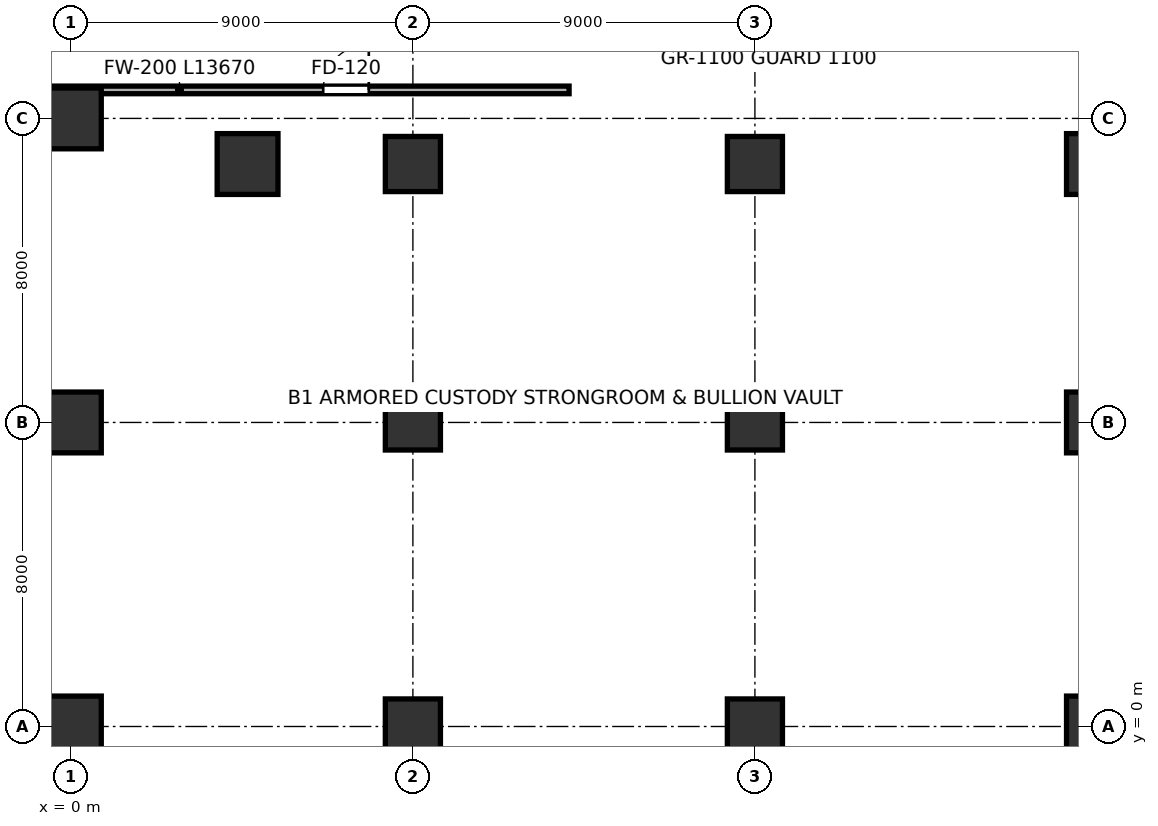
"""IFC4 building model, lengths in metres.
Left out: names, types, materials, properties, quantities, classifications, styles, units other than length and angle.
Written with IfcOpenShell. Run it as: python <this file> out.ifc"""

import sys

from ifc_helpers import new_model, si_unit, direction, frame, frame_2d, origin, origin_2d, place, context, subcontext, project, spatial, rectangle, extrude, source, transform, mapped, element, fill, save


model = new_model("IFC4")
c1 = context("Model", 3, precision=1e-05, world=origin(), true_north=direction((0.0, 1.0)))
c2 = subcontext(c1, "Body", "Model", "MODEL_VIEW")
j1 = project(units=[si_unit("LENGTHUNIT", "METRE"), si_unit("PLANEANGLEUNIT", "RADIAN")], contexts=[c1])
p1 = place(None, origin())
s1 = spatial("IfcSite", under=j1, at=p1, CompositionType="ELEMENT")
p2 = place(p1, origin())
s2 = spatial("IfcBuilding", under=s1, at=p2, CompositionType="ELEMENT")
p3 = place(p2, frame((0.0, 0.0, -4.8)))
s3 = spatial("IfcBuildingStorey", under=s2, at=p3, CompositionType="ELEMENT", Elevation=-4.8)
m1 = source(origin(), c2, "Body", "SweptSolid", [
    extrude(rectangle(XDim=1.6, YDim=1.6, at=origin_2d()), origin(), (0.0, 0.0, 1.0), 4.599),
])
p4 = place(p3, frame((0.0, 0.0, 0.001), z_axis=(0.0, 0.0, 1.0), x_axis=(1.0, 0.0, 0.0)))
e1 = element("IfcColumn", 1, at=p4, inside=s3, PredefinedType="COLUMN", context=c2, shape_type="MappedRepresentation", body=[
    mapped(m1, transform((0.0, 0.0, 0.0), scale=1.0)),
])
m2 = source(origin(), c2, "Body", "SweptSolid", [
    extrude(rectangle(XDim=1.6, YDim=1.6, at=origin_2d()), origin(), (0.0, 0.0, 1.0), 4.799),
])
for number, where, z_axis, x_axis in (
    (2, (0.0, 8.0, 0.001), (0.0, 0.0, 1.0), (1.0, 0.0, 0.0)),
    (3, (0.0, 16.0, 0.001), (0.0, 0.0, 1.0), (1.0, 0.0, 0.0)),
):
    element("IfcColumn", number, at=place(p3, frame(where, z_axis=z_axis, x_axis=x_axis)), inside=s3, PredefinedType="COLUMN", context=c2, shape_type="MappedRepresentation", body=[
        mapped(m2, transform((0.0, 0.0, 0.0), scale=1.0)),
    ])
m3 = source(origin(), c2, "Body", "SweptSolid", [
    extrude(rectangle(XDim=1.45, YDim=1.45, at=origin_2d()), origin(), (0.0, 0.0, 1.0), 4.799),
])
p5 = place(p3, frame((9.0, 0.0, 0.001), z_axis=(0.0, 0.0, 1.0), x_axis=(1.0, 0.0, 0.0)))
e4 = element("IfcColumn", 4, at=p5, inside=s3, PredefinedType="COLUMN", context=c2, shape_type="MappedRepresentation", body=[
    mapped(m3, transform((0.0, 0.0, 0.0), scale=1.0)),
])
m4 = source(origin(), c2, "Body", "SweptSolid", [
    extrude(rectangle(XDim=1.45, YDim=1.45, at=origin_2d()), origin(), (0.0, 0.0, 1.0), 4.799),
])
for number, where, z_axis, x_axis in (
    (5, (9.0, 8.0, 0.001), (0.0, 0.0, 1.0), (1.0, 0.0, 0.0)),
    (6, (9.0, 14.8, 0.001), (0.0, 0.0, 1.0), (1.0, 0.0, 0.0)),
):
    element("IfcColumn", number, at=place(p3, frame(where, z_axis=z_axis, x_axis=x_axis)), inside=s3, PredefinedType="COLUMN", context=c2, shape_type="MappedRepresentation", body=[
        mapped(m4, transform((0.0, 0.0, 0.0), scale=1.0)),
    ])
p6 = place(p3, frame((18.0, 0.0, 0.001), z_axis=(0.0, 0.0, 1.0), x_axis=(1.0, 0.0, 0.0)))
e7 = element("IfcColumn", 7, at=p6, inside=s3, PredefinedType="COLUMN", context=c2, shape_type="MappedRepresentation", body=[
    mapped(m3, transform((0.0, 0.0, 0.0), scale=1.0)),
])
for number, where, z_axis, x_axis in (
    (8, (18.0, 8.0, 0.001), (0.0, 0.0, 1.0), (1.0, 0.0, 0.0)),
    (9, (18.0, 14.8, 0.001), (0.0, 0.0, 1.0), (1.0, 0.0, 0.0)),
):
    element("IfcColumn", number, at=place(p3, frame(where, z_axis=z_axis, x_axis=x_axis)), inside=s3, PredefinedType="COLUMN", context=c2, shape_type="MappedRepresentation", body=[
        mapped(m4, transform((0.0, 0.0, 0.0), scale=1.0)),
    ])
p7 = place(p3, frame((27.0, 0.0, 0.001), z_axis=(0.0, 0.0, 1.0), x_axis=(1.0, 0.0, 0.0)))
e10 = element("IfcColumn", 10, at=p7, inside=s3, PredefinedType="COLUMN", context=c2, shape_type="MappedRepresentation", body=[
    mapped(m2, transform((0.0, 0.0, 0.0), scale=1.0)),
])
m5 = source(origin(), c2, "Body", "SweptSolid", [
    extrude(rectangle(XDim=1.6, YDim=1.6, at=origin_2d()), origin(), (0.0, 0.0, 1.0), 4.799),
])
for number, where, z_axis, x_axis in (
    (11, (27.0, 8.0, 0.001), (0.0, 0.0, 1.0), (1.0, 0.0, 0.0)),
    (12, (27.0, 14.8, 0.001), (0.0, 0.0, 1.0), (1.0, 0.0, 0.0)),
    (13, (4.65, 14.8, 0.001), (0.0, 0.0, 1.0), (1.0, 0.0, 0.0)),
):
    element("IfcColumn", number, at=place(p3, frame(where, z_axis=z_axis, x_axis=x_axis)), inside=s3, PredefinedType="COLUMN", context=c2, shape_type="MappedRepresentation", body=[
        mapped(m5, transform((0.0, 0.0, 0.0), scale=1.0)),
    ])
p8 = place(p3, frame((-0.56, 16.75, 0.0), z_axis=(0.0, 0.0, 1.0), x_axis=(1.0, 0.0, 0.0)))
e14 = element("IfcWall", 14, at=p8, inside=s3, PredefinedType="SOLIDWALL", context=c2, shape_type="SweptSolid", body=[
    extrude(rectangle(XDim=13.67, YDim=0.2, at=frame_2d((6.835, 0.0))), origin(), (0.0, 0.0, 1.0), 3.65),
])
p9 = place(p8, frame((7.2, 0.0, 0.0)))
e15 = element("IfcOpeningElement", 15, at=p9, cuts=e14, PredefinedType="OPENING", context=c2, shape_type="SweptSolid", body=[
    extrude(rectangle(XDim=1.2, YDim=2.2, at=frame_2d((0.6, 1.1))), frame((0.0, 0.11, 0.0), z_axis=(0.0, -1.0, 0.0), x_axis=(1.0, 0.0, 0.0)), (0.0, 0.0, 1.0), 0.22),
])
m6 = source(origin(), c2, "Body", "SweptSolid", [
    extrude(rectangle(XDim=1.2, YDim=2.2, at=frame_2d((0.6, 1.1))), frame((0.0, 0.025, 0.0), z_axis=(0.0, -1.0, 0.0), x_axis=(1.0, 0.0, 0.0)), (0.0, 0.0, 1.0), 0.05),
])
p10 = place(p9, origin())
e16 = element("IfcDoor", 16, at=p10, inside=s3, OperationType="SINGLE_SWING_RIGHT", PredefinedType="DOOR", context=c2, shape_type="MappedRepresentation", body=[
    mapped(m6, transform((0.0, 0.0, 0.0), scale=1.0)),
])
fill(e15, e16)
save(model, sys.argv[1])
